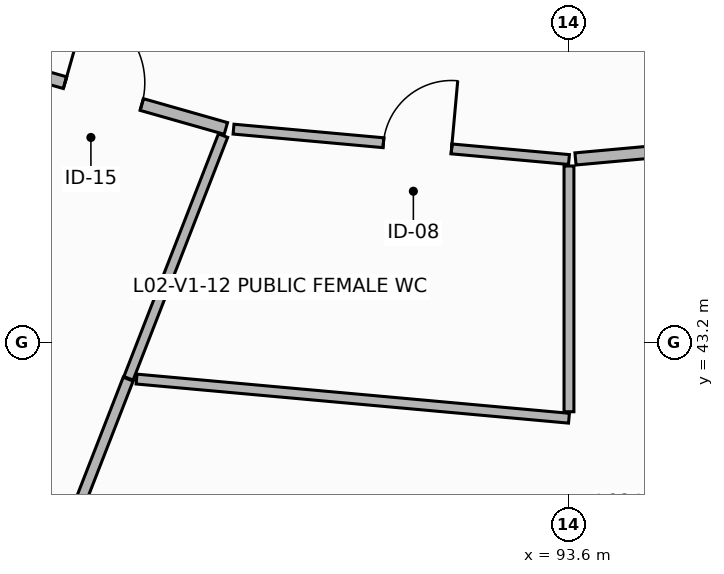
"""IFC4 building model, lengths in metres.
Left out: names, types, materials, properties, quantities, classifications, styles, units other than length and angle.
Written with IfcOpenShell. Run it as: python <this file> out.ifc"""

import sys

from ifc_helpers import new_model, si_unit, direction, frame, frame_2d, origin, place, context, subcontext, project, spatial, rectangle, extrude, element, fill, save


model = new_model("IFC4")
c1 = context("Model", 3, precision=1e-05, world=origin(), true_north=direction((0.0, 1.0)))
c2 = subcontext(c1, "Body", "Model", "MODEL_VIEW")
j1 = project(units=[si_unit("LENGTHUNIT", "METRE"), si_unit("PLANEANGLEUNIT", "RADIAN")], contexts=[c1])
p1 = place(None, origin())
s1 = spatial("IfcSite", under=j1, at=p1, CompositionType="ELEMENT")
p2 = place(p1, origin())
s2 = spatial("IfcBuilding", under=s1, at=p2, CompositionType="ELEMENT")
p3 = place(p2, frame((0.0, 0.0, 8.4)))
s3 = spatial("IfcBuildingStorey", under=s2, at=p3, CompositionType="ELEMENT", Elevation=8.4)
p4 = place(p3, frame((85.003, 47.181, 0.0), z_axis=(0.0, 0.0, 1.0), x_axis=(0.961816382147, -0.273695537111, 0.0)))
e1 = element("IfcWall", 1, at=p4, inside=s3, PredefinedType="PARTITIONING", context=c2, shape_type="SweptSolid", body=[
    extrude(rectangle(XDim=4.245, YDim=0.16, at=frame_2d((2.123, 0.0))), origin(), (0.0, 0.0, 1.0), 2.99),
])
p5 = place(p4, frame((2.045, 0.0, 0.0)))
e2 = element("IfcOpeningElement", 2, at=p5, cuts=e1, PredefinedType="OPENING", context=c2, shape_type="SweptSolid", body=[
    extrude(rectangle(XDim=1.05, YDim=2.2, at=frame_2d((0.525, 1.1))), frame((0.0, 0.09, 0.0), z_axis=(0.0, -1.0, 0.0), x_axis=(1.0, 0.0, 0.0)), (0.0, 0.0, 1.0), 0.18),
])
p6 = place(p3, frame((89.049, 45.925, 0.0), z_axis=(0.0, 0.0, 1.0), x_axis=(-0.36304782486, -0.931770506543, 0.0)))
e3 = element("IfcWall", 3, at=p6, inside=s3, PredefinedType="PARTITIONING", context=c2, shape_type="SweptSolid", body=[
    extrude(rectangle(XDim=3.427, YDim=0.13, at=frame_2d((1.713, 0.0))), origin(), (0.0, 0.0, 1.0), 2.99),
])
p7 = place(p3, frame((87.801, 42.721, 0.0), z_axis=(0.0, 0.0, 1.0), x_axis=(-0.363096615432, -0.931751494693, 0.0)))
e4 = element("IfcWall", 4, at=p7, inside=s3, PredefinedType="PARTITIONING", context=c2, shape_type="SweptSolid", body=[
    extrude(rectangle(XDim=6.503, YDim=0.14, at=frame_2d((3.251, 0.0))), origin(), (0.0, 0.0, 1.0), 2.99),
])
p8 = place(p3, frame((93.6, 42.207, 0.0), z_axis=(0.0, 0.0, 1.0), x_axis=(-0.995929558444, 0.090134979992, 0.0)))
e5 = element("IfcWall", 5, at=p8, inside=s3, PredefinedType="PARTITIONING", context=c2, shape_type="SweptSolid", body=[
    extrude(rectangle(XDim=5.712, YDim=0.13, at=frame_2d((2.856, 0.0))), origin(), (0.0, 0.0, 1.0), 2.99),
])
p9 = place(p3, frame((89.187, 46.01, 0.0), z_axis=(0.0, 0.0, 1.0), x_axis=(0.995919358075, -0.090247616095, 0.0)))
e6 = element("IfcWall", 6, at=p9, inside=s3, PredefinedType="PARTITIONING", context=c2, shape_type="SweptSolid", body=[
    extrude(rectangle(XDim=4.431, YDim=0.13, at=frame_2d((2.216, 0.0))), origin(), (0.0, 0.0, 1.0), 2.99),
])
p10 = place(p9, frame((1.98, 0.0, 0.0)))
e7 = element("IfcOpeningElement", 7, at=p10, cuts=e6, PredefinedType="OPENING", context=c2, shape_type="SweptSolid", body=[
    extrude(rectangle(XDim=0.9, YDim=2.1, at=frame_2d((0.45, 1.05))), frame((0.0, 0.075, 0.0), z_axis=(0.0, -1.0, 0.0), x_axis=(1.0, 0.0, 0.0)), (0.0, 0.0, 1.0), 0.15),
])
p11 = place(p3, frame((93.6, 45.525, 0.0), z_axis=(0.0, 0.0, 1.0), x_axis=(0.0, -1.0, 0.0)))
e8 = element("IfcWall", 8, at=p11, inside=s3, PredefinedType="PARTITIONING", context=c2, shape_type="SweptSolid", body=[
    extrude(rectangle(XDim=3.233, YDim=0.13, at=frame_2d((1.616, 0.0))), origin(), (0.0, 0.0, 1.0), 2.99),
])
p12 = place(p3, frame((93.686, 45.618, 0.0), z_axis=(0.0, 0.0, 1.0), x_axis=(0.995921961863, 0.090218877617, 0.0)))
e9 = element("IfcWall", 9, at=p12, inside=s3, PredefinedType="PARTITIONING", context=c2, shape_type="SweptSolid", body=[
    extrude(rectangle(XDim=4.446, YDim=0.16, at=frame_2d((2.223, 0.0))), origin(), (0.0, 0.0, 1.0), 2.99),
])
p13 = place(p12, frame((1.366, 0.0, 0.0)))
e10 = element("IfcOpeningElement", 10, at=p13, cuts=e9, PredefinedType="OPENING", context=c2, shape_type="SweptSolid", body=[
    extrude(rectangle(XDim=1.05, YDim=2.15, at=frame_2d((0.525, 1.075))), frame((0.0, 0.09, 0.0), z_axis=(0.0, -1.0, 0.0), x_axis=(1.0, 0.0, 0.0)), (0.0, 0.0, 1.0), 0.18),
])
p14 = place(p5, origin())
e11 = element("IfcDoor", 11, at=p14, inside=s3, OperationType="SINGLE_SWING_LEFT", PredefinedType="DOOR", context=c2, shape_type="SweptSolid", body=[
    extrude(rectangle(XDim=1.05, YDim=2.2, at=frame_2d((0.525, 1.1))), frame((0.0, 0.025, 0.0), z_axis=(0.0, -1.0, 0.0), x_axis=(1.0, 0.0, 0.0)), (0.0, 0.0, 1.0), 0.05),
])
fill(e2, e11)
p15 = place(p10, origin())
e12 = element("IfcDoor", 12, at=p15, inside=s3, OperationType="SINGLE_SWING_RIGHT", PredefinedType="DOOR", context=c2, shape_type="SweptSolid", body=[
    extrude(rectangle(XDim=0.9, YDim=2.1, at=frame_2d((0.45, 1.05))), frame((0.0, 0.025, 0.0), z_axis=(0.0, -1.0, 0.0), x_axis=(1.0, 0.0, 0.0)), (0.0, 0.0, 1.0), 0.05),
])
fill(e7, e12)
save(model, sys.argv[1])
